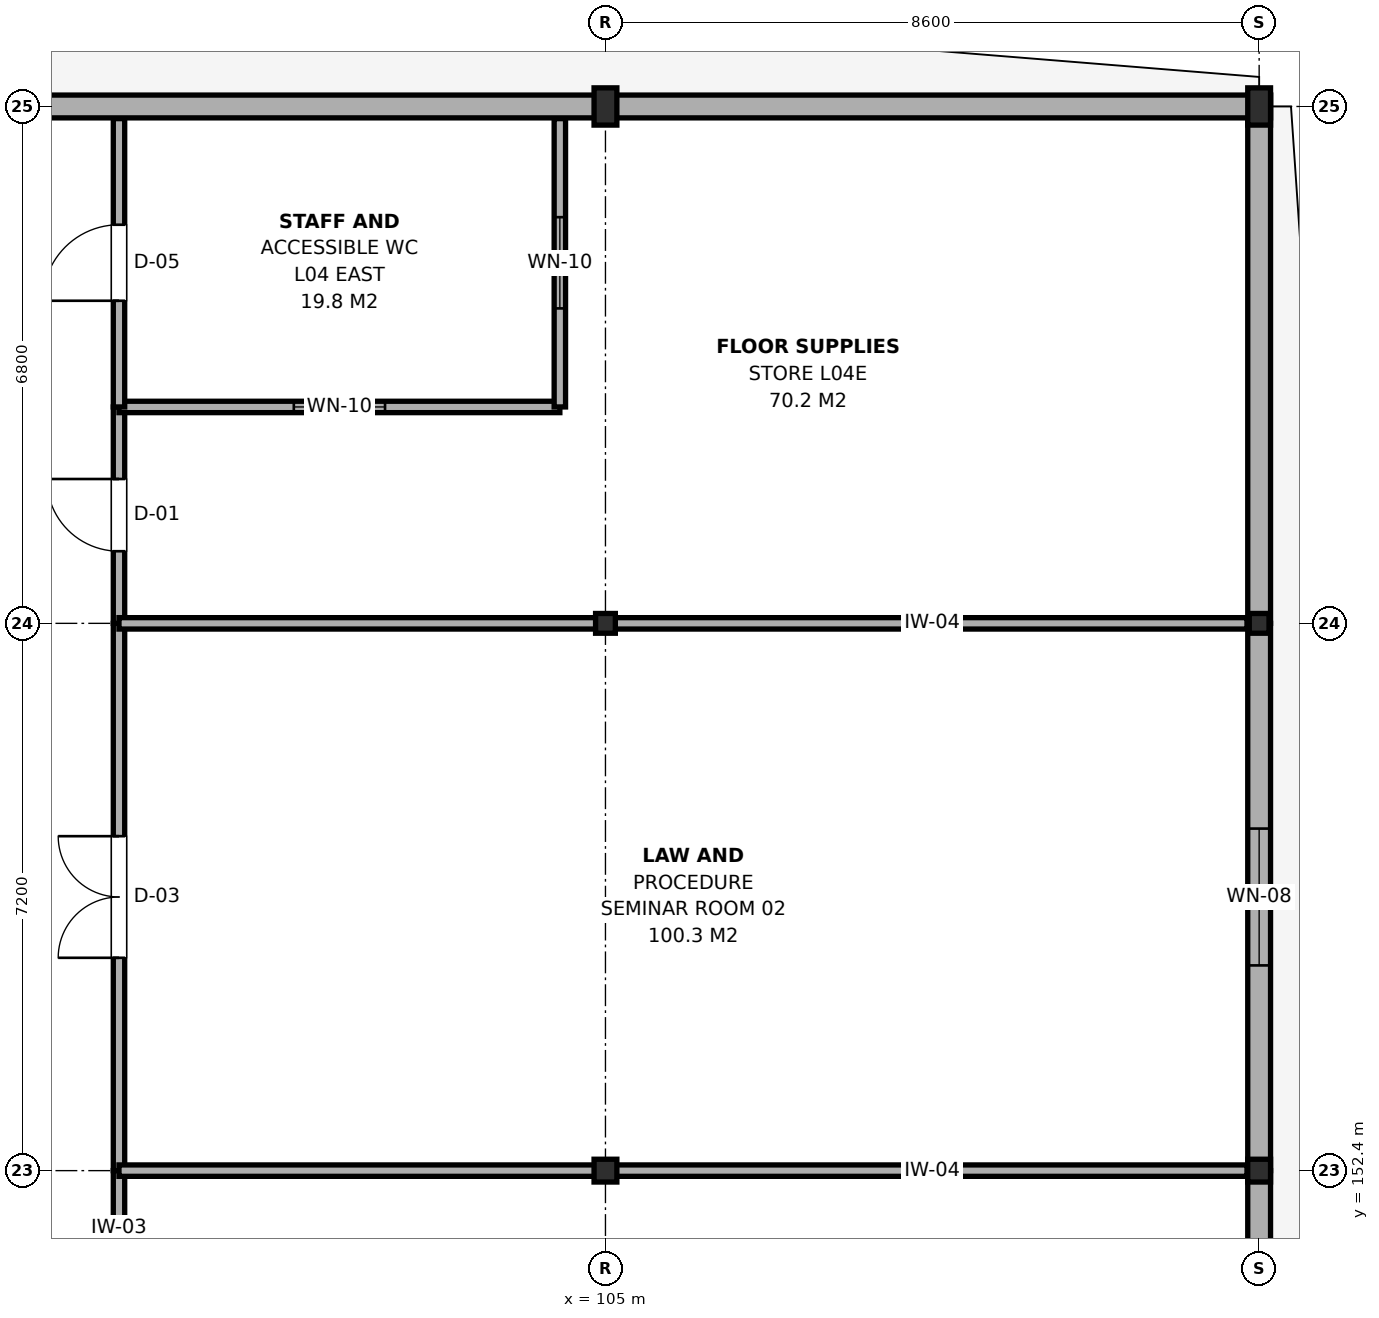
"""IFC4 building model, lengths in metres.
Left out: names, types, materials, properties, quantities, classifications, styles, units other than length and angle.
Written with IfcOpenShell. Run it as: python <this file> out.ifc"""

import sys

from ifc_helpers import new_model, si_unit, direction, frame, frame_2d, origin, origin_2d, place, context, subcontext, project, spatial, rectangle, i_section, extrude, element, fill, save


model = new_model("IFC4")
c1 = context("Model", 3, precision=1e-05, world=origin(), true_north=direction((0.0, 1.0)))
c2 = subcontext(c1, "Body", "Model", "MODEL_VIEW")
j1 = project(units=[si_unit("LENGTHUNIT", "METRE"), si_unit("PLANEANGLEUNIT", "RADIAN")], contexts=[c1])
p1 = place(None, origin())
s1 = spatial("IfcSite", under=j1, at=p1, CompositionType="ELEMENT")
p2 = place(p1, origin())
s2 = spatial("IfcBuilding", under=s1, at=p2, CompositionType="ELEMENT")
p3 = place(p2, frame((0.0, 0.0, 17.1)))
s3 = spatial("IfcBuildingStorey", under=s2, at=p3, CompositionType="ELEMENT", Elevation=17.1)
p4 = place(p3, frame((105.0, 152.4, 0.0), z_axis=(0.0, 0.0, 1.0), x_axis=(1.0, 0.0, 0.0)))
e1 = element("IfcColumn", 1, at=p4, inside=s3, PredefinedType="COLUMN", context=c2, shape_type="SweptSolid", body=[
    extrude(i_section(OverallWidth=0.3, OverallDepth=0.3, WebThickness=0.011, FlangeThickness=0.019, FilletRadius=0.027, at=origin_2d()), origin(), (0.0, 0.0, 1.0), 3.9),
])
p5 = place(p3, frame((105.0, 159.6, 0.0), z_axis=(0.0, 0.0, 1.0), x_axis=(1.0, 0.0, 0.0)))
e2 = element("IfcColumn", 2, at=p5, inside=s3, PredefinedType="COLUMN", context=c2, shape_type="SweptSolid", body=[
    extrude(i_section(OverallWidth=0.26, OverallDepth=0.26, WebThickness=0.01, FlangeThickness=0.018, FilletRadius=0.024, at=origin_2d()), origin(), (0.0, 0.0, 1.0), 3.9),
])
p6 = place(p3, frame((105.0, 166.4, 0.0), z_axis=(0.0, 0.0, 1.0), x_axis=(1.0, 0.0, 0.0)))
e3 = element("IfcColumn", 3, at=p6, inside=s3, PredefinedType="COLUMN", context=c2, shape_type="SweptSolid", body=[
    extrude(i_section(OverallWidth=0.3, OverallDepth=0.49, WebThickness=0.012, FlangeThickness=0.023, FilletRadius=0.027, at=origin_2d()), origin(), (0.0, 0.0, 1.0), 3.9),
])
p7 = place(p3, frame((113.6, 152.4, 0.0), z_axis=(0.0, 0.0, 1.0), x_axis=(1.0, 0.0, 0.0)))
e4 = element("IfcColumn", 4, at=p7, inside=s3, PredefinedType="COLUMN", context=c2, shape_type="SweptSolid", body=[
    extrude(i_section(OverallWidth=0.3, OverallDepth=0.3, WebThickness=0.011, FlangeThickness=0.019, FilletRadius=0.027, at=origin_2d()), origin(), (0.0, 0.0, 1.0), 3.9),
])
p8 = place(p3, frame((113.6, 159.6, 0.0), z_axis=(0.0, 0.0, 1.0), x_axis=(1.0, 0.0, 0.0)))
e5 = element("IfcColumn", 5, at=p8, inside=s3, PredefinedType="COLUMN", context=c2, shape_type="SweptSolid", body=[
    extrude(i_section(OverallWidth=0.26, OverallDepth=0.26, WebThickness=0.01, FlangeThickness=0.018, FilletRadius=0.024, at=origin_2d()), origin(), (0.0, 0.0, 1.0), 3.9),
])
p9 = place(p3, frame((113.6, 166.4, 0.0), z_axis=(0.0, 0.0, 1.0), x_axis=(1.0, 0.0, 0.0)))
e6 = element("IfcColumn", 6, at=p9, inside=s3, PredefinedType="COLUMN", context=c2, shape_type="SweptSolid", body=[
    extrude(i_section(OverallWidth=0.3, OverallDepth=0.49, WebThickness=0.012, FlangeThickness=0.023, FilletRadius=0.027, at=origin_2d()), origin(), (0.0, 0.0, 1.0), 3.9),
])
p10 = place(p3, frame((113.6, 145.2, 0.0), z_axis=(0.0, 0.0, 1.0), x_axis=(0.0, 1.0, 0.0)))
e7 = element("IfcWall", 7, at=p10, inside=s3, PredefinedType="SOLIDWALL", context=c2, shape_type="SweptSolid", body=[
    extrude(rectangle(XDim=7.2, YDim=0.3, at=frame_2d((3.6, 0.0))), origin(), (0.0, 0.0, 1.0), 3.095),
])
p11 = place(p10, frame((2.7, 0.0, 0.65)))
e8 = element("IfcOpeningElement", 8, at=p11, cuts=e7, PredefinedType="OPENING", context=c2, shape_type="SweptSolid", body=[
    extrude(rectangle(XDim=1.8, YDim=1.2, at=frame_2d((0.9, 0.6))), frame((0.0, 0.165, 0.0), z_axis=(0.0, -1.0, 0.0), x_axis=(1.0, 0.0, 0.0)), (0.0, 0.0, 1.0), 0.33),
])
p12 = place(p3, frame((113.6, 152.4, 0.0), z_axis=(0.0, 0.0, 1.0), x_axis=(0.0, 1.0, 0.0)))
e9 = element("IfcWall", 9, at=p12, inside=s3, PredefinedType="SOLIDWALL", context=c2, shape_type="SweptSolid", body=[
    extrude(rectangle(XDim=7.2, YDim=0.3, at=frame_2d((3.6, 0.0))), origin(), (0.0, 0.0, 1.0), 3.095),
])
p13 = place(p12, frame((2.7, 0.0, 0.65)))
e10 = element("IfcOpeningElement", 10, at=p13, cuts=e9, PredefinedType="OPENING", context=c2, shape_type="SweptSolid", body=[
    extrude(rectangle(XDim=1.8, YDim=1.2, at=frame_2d((0.9, 0.6))), frame((0.0, 0.165, 0.0), z_axis=(0.0, -1.0, 0.0), x_axis=(1.0, 0.0, 0.0)), (0.0, 0.0, 1.0), 0.33),
])
p14 = place(p3, frame((113.6, 159.6, 0.0), z_axis=(0.0, 0.0, 1.0), x_axis=(0.0, 1.0, 0.0)))
e11 = element("IfcWall", 11, at=p14, inside=s3, PredefinedType="SOLIDWALL", context=c2, shape_type="SweptSolid", body=[
    extrude(rectangle(XDim=6.95, YDim=0.3, at=frame_2d((3.475, 0.0))), origin(), (0.0, 0.0, 1.0), 3.145),
])
p15 = place(p3, frame((96.0, 166.4, 0.0), z_axis=(0.0, 0.0, 1.0), x_axis=(1.0, 0.0, 0.0)))
e12 = element("IfcWall", 12, at=p15, inside=s3, PredefinedType="SOLIDWALL", context=c2, shape_type="SweptSolid", body=[
    extrude(rectangle(XDim=9.0, YDim=0.3, at=frame_2d((4.5, 0.0))), origin(), (0.0, 0.0, 1.0), 3.105),
])
p16 = place(p3, frame((105.0, 166.4, 0.0), z_axis=(0.0, 0.0, 1.0), x_axis=(1.0, 0.0, 0.0)))
e13 = element("IfcWall", 13, at=p16, inside=s3, PredefinedType="SOLIDWALL", context=c2, shape_type="SweptSolid", body=[
    extrude(rectangle(XDim=8.75, YDim=0.3, at=frame_2d((4.375, 0.0))), origin(), (0.0, 0.0, 1.0), 3.105),
])
p17 = place(p3, frame((98.6, 142.2, 0.0), z_axis=(0.0, 0.0, 1.0), x_axis=(0.0, 1.0, 0.0)))
e14 = element("IfcWall", 14, at=p17, inside=s3, PredefinedType="PARTITIONING", context=c2, shape_type="SweptSolid", body=[
    extrude(rectangle(XDim=10.2, YDim=0.15, at=frame_2d((5.1, 0.0))), origin(), (0.0, 0.0, 1.0), 3.255),
])
p18 = place(p17, frame((4.3, 0.0, 0.0)))
e15 = element("IfcOpeningElement", 15, at=p18, cuts=e14, PredefinedType="OPENING", context=c2, shape_type="SweptSolid", body=[
    extrude(rectangle(XDim=1.6, YDim=2.15, at=frame_2d((0.8, 1.075))), frame((0.0, 0.09, 0.0), z_axis=(0.0, -1.0, 0.0), x_axis=(1.0, 0.0, 0.0)), (0.0, 0.0, 1.0), 0.18),
])
p19 = place(p3, frame((98.6, 152.4, 0.0), z_axis=(0.0, 0.0, 1.0), x_axis=(0.0, 1.0, 0.0)))
e16 = element("IfcWall", 16, at=p19, inside=s3, PredefinedType="PARTITIONING", context=c2, shape_type="SweptSolid", body=[
    extrude(rectangle(XDim=7.2, YDim=0.15, at=frame_2d((3.6, 0.0))), origin(), (0.0, 0.0, 1.0), 3.155),
])
p20 = place(p19, frame((2.8, 0.0, 0.0)))
e17 = element("IfcOpeningElement", 17, at=p20, cuts=e16, PredefinedType="OPENING", context=c2, shape_type="SweptSolid", body=[
    extrude(rectangle(XDim=1.6, YDim=2.15, at=frame_2d((0.8, 1.075))), frame((0.0, 0.09, 0.0), z_axis=(0.0, -1.0, 0.0), x_axis=(1.0, 0.0, 0.0)), (0.0, 0.0, 1.0), 0.18),
])
p21 = place(p3, frame((98.6, 152.4, 0.0), z_axis=(0.0, 0.0, 1.0), x_axis=(1.0, 0.0, 0.0)))
e18 = element("IfcWall", 18, at=p21, inside=s3, PredefinedType="PARTITIONING", context=c2, shape_type="SweptSolid", body=[
    extrude(rectangle(XDim=14.84, YDim=0.15, at=frame_2d((7.42, 0.0))), origin(), (0.0, 0.0, 1.0), 3.095),
])
p22 = place(p3, frame((98.6, 159.6, 0.0), z_axis=(0.0, 0.0, 1.0), x_axis=(0.0, 1.0, 0.0)))
e19 = element("IfcWall", 19, at=p22, inside=s3, PredefinedType="PARTITIONING", context=c2, shape_type="SweptSolid", body=[
    extrude(rectangle(XDim=2.847, YDim=0.15, at=frame_2d((1.423, 0.0))), origin(), (0.0, 0.0, 1.0), 3.155),
])
p23 = place(p22, frame((0.949, 0.0, 0.0)))
e20 = element("IfcOpeningElement", 20, at=p23, cuts=e19, PredefinedType="OPENING", context=c2, shape_type="SweptSolid", body=[
    extrude(rectangle(XDim=0.95, YDim=2.15, at=frame_2d((0.475, 1.075))), frame((0.0, 0.09, 0.0), z_axis=(0.0, -1.0, 0.0), x_axis=(1.0, 0.0, 0.0)), (0.0, 0.0, 1.0), 0.18),
])
p24 = place(p3, frame((98.6, 162.447, 0.0), z_axis=(0.0, 0.0, 1.0), x_axis=(1.0, 0.0, 0.0)))
e21 = element("IfcWall", 21, at=p24, inside=s3, PredefinedType="PARTITIONING", context=c2, shape_type="SweptSolid", body=[
    extrude(rectangle(XDim=5.8, YDim=0.15, at=frame_2d((2.9, 0.0))), origin(), (0.0, 0.0, 1.0), 3.695),
])
p25 = place(p24, frame((2.3, 0.0, 0.95)))
e22 = element("IfcOpeningElement", 22, at=p25, cuts=e21, PredefinedType="OPENING", context=c2, shape_type="SweptSolid", body=[
    extrude(rectangle(XDim=1.2, YDim=1.5, at=frame_2d((0.6, 0.75))), frame((0.0, 0.09, 0.0), z_axis=(0.0, -1.0, 0.0), x_axis=(1.0, 0.0, 0.0)), (0.0, 0.0, 1.0), 0.18),
])
p26 = place(p3, frame((104.4, 162.447, 0.0), z_axis=(0.0, 0.0, 1.0), x_axis=(0.0, 1.0, 0.0)))
e23 = element("IfcWall", 23, at=p26, inside=s3, PredefinedType="PARTITIONING", context=c2, shape_type="SweptSolid", body=[
    extrude(rectangle(XDim=3.793, YDim=0.15, at=frame_2d((1.896, 0.0))), origin(), (0.0, 0.0, 1.0), 3.345),
])
p27 = place(p26, frame((1.296, 0.0, 0.95)))
e24 = element("IfcOpeningElement", 24, at=p27, cuts=e23, PredefinedType="OPENING", context=c2, shape_type="SweptSolid", body=[
    extrude(rectangle(XDim=1.2, YDim=1.5, at=frame_2d((0.6, 0.75))), frame((0.0, 0.09, 0.0), z_axis=(0.0, -1.0, 0.0), x_axis=(1.0, 0.0, 0.0)), (0.0, 0.0, 1.0), 0.18),
])
p28 = place(p3, frame((98.6, 162.447, 0.0), z_axis=(0.0, 0.0, 1.0), x_axis=(0.0, 1.0, 0.0)))
e25 = element("IfcWall", 25, at=p28, inside=s3, PredefinedType="PARTITIONING", context=c2, shape_type="SweptSolid", body=[
    extrude(rectangle(XDim=3.793, YDim=0.15, at=frame_2d((1.896, 0.0))), origin(), (0.0, 0.0, 1.0), 3.345),
])
p29 = place(p28, frame((1.397, 0.0, 0.0)))
e26 = element("IfcOpeningElement", 26, at=p29, cuts=e25, PredefinedType="OPENING", context=c2, shape_type="SweptSolid", body=[
    extrude(rectangle(XDim=1.0, YDim=2.15, at=frame_2d((0.5, 1.075))), frame((0.0, 0.09, 0.0), z_axis=(0.0, -1.0, 0.0), x_axis=(1.0, 0.0, 0.0)), (0.0, 0.0, 1.0), 0.18),
])
p30 = place(p3, frame((98.6, 159.6, 0.0), z_axis=(0.0, 0.0, 1.0), x_axis=(1.0, 0.0, 0.0)))
e27 = element("IfcWall", 27, at=p30, inside=s3, PredefinedType="PARTITIONING", context=c2, shape_type="SweptSolid", body=[
    extrude(rectangle(XDim=14.84, YDim=0.15, at=frame_2d((7.42, 0.0))), origin(), (0.0, 0.0, 1.0), 3.145),
])
p31 = place(p13, origin())
e28 = element("IfcWindow", 28, at=p31, inside=s3, PartitioningType="SINGLE_PANEL", PredefinedType="WINDOW", context=c2, shape_type="SweptSolid", body=[
    extrude(rectangle(XDim=1.8, YDim=1.2, at=frame_2d((0.9, 0.6))), frame((0.0, 0.03, 0.0), z_axis=(0.0, -1.0, 0.0), x_axis=(1.0, 0.0, 0.0)), (0.0, 0.0, 1.0), 0.06),
])
fill(e10, e28)
p32 = place(p20, origin())
e29 = element("IfcDoor", 29, at=p32, inside=s3, OperationType="DOUBLE_DOOR_SINGLE_SWING", PredefinedType="DOOR", context=c2, shape_type="SweptSolid", body=[
    extrude(rectangle(XDim=1.6, YDim=2.15, at=frame_2d((0.8, 1.075))), frame((0.0, 0.025, 0.0), z_axis=(0.0, -1.0, 0.0), x_axis=(1.0, 0.0, 0.0)), (0.0, 0.0, 1.0), 0.05),
])
fill(e17, e29)
p33 = place(p23, origin())
e30 = element("IfcDoor", 30, at=p33, inside=s3, OperationType="SINGLE_SWING_RIGHT", PredefinedType="DOOR", context=c2, shape_type="SweptSolid", body=[
    extrude(rectangle(XDim=0.95, YDim=2.15, at=frame_2d((0.475, 1.075))), frame((0.0, 0.025, 0.0), z_axis=(0.0, -1.0, 0.0), x_axis=(1.0, 0.0, 0.0)), (0.0, 0.0, 1.0), 0.05),
])
fill(e20, e30)
p34 = place(p25, origin())
e31 = element("IfcWindow", 31, at=p34, inside=s3, PartitioningType="SINGLE_PANEL", PredefinedType="WINDOW", context=c2, shape_type="SweptSolid", body=[
    extrude(rectangle(XDim=1.2, YDim=1.5, at=frame_2d((0.6, 0.75))), frame((0.0, 0.03, 0.0), z_axis=(0.0, -1.0, 0.0), x_axis=(1.0, 0.0, 0.0)), (0.0, 0.0, 1.0), 0.06),
])
fill(e22, e31)
p35 = place(p27, origin())
e32 = element("IfcWindow", 32, at=p35, inside=s3, PartitioningType="SINGLE_PANEL", PredefinedType="WINDOW", context=c2, shape_type="SweptSolid", body=[
    extrude(rectangle(XDim=1.2, YDim=1.5, at=frame_2d((0.6, 0.75))), frame((0.0, 0.03, 0.0), z_axis=(0.0, -1.0, 0.0), x_axis=(1.0, 0.0, 0.0)), (0.0, 0.0, 1.0), 0.06),
])
fill(e24, e32)
p36 = place(p29, origin())
e33 = element("IfcDoor", 33, at=p36, inside=s3, OperationType="SINGLE_SWING_LEFT", PredefinedType="DOOR", context=c2, shape_type="SweptSolid", body=[
    extrude(rectangle(XDim=1.0, YDim=2.15, at=frame_2d((0.5, 1.075))), frame((0.0, 0.025, 0.0), z_axis=(0.0, -1.0, 0.0), x_axis=(1.0, 0.0, 0.0)), (0.0, 0.0, 1.0), 0.05),
])
fill(e26, e33)
save(model, sys.argv[1])
